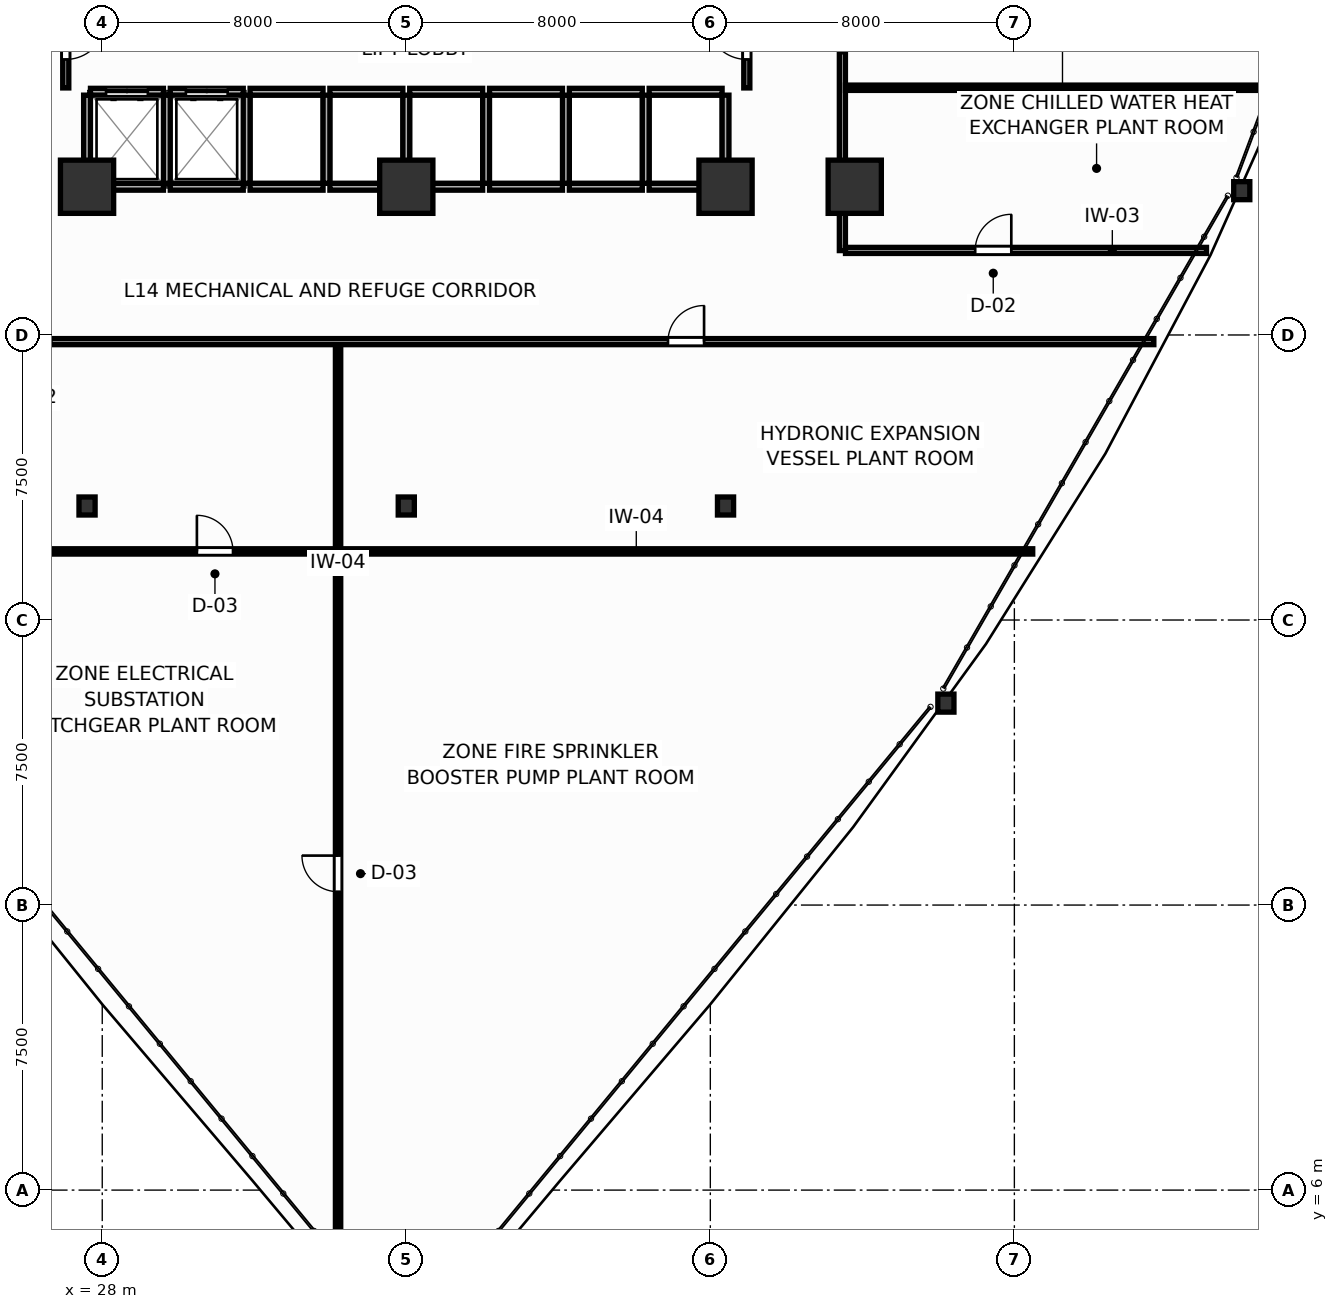
"""IFC4 building model, lengths in metres.
Left out: names, types, materials, properties, quantities, classifications, styles, units other than length and angle.
Written with IfcOpenShell. Run it as: python <this file> out.ifc"""

import sys

from ifc_helpers import new_model, si_unit, direction, frame, frame_2d, origin, origin_2d, place, context, subcontext, project, spatial, rectangle, i_section, extrude, source, transform, mapped, element, fill, save


model = new_model("IFC4")
c1 = context("Model", 3, precision=1e-05, world=origin(), true_north=direction((0.0, 1.0)))
c2 = subcontext(c1, "Body", "Model", "MODEL_VIEW")
j1 = project(units=[si_unit("LENGTHUNIT", "METRE"), si_unit("PLANEANGLEUNIT", "RADIAN")], contexts=[c1])
p1 = place(None, origin())
s1 = spatial("IfcSite", under=j1, at=p1, CompositionType="ELEMENT")
p2 = place(p1, origin())
s2 = spatial("IfcBuilding", under=s1, at=p2, CompositionType="ELEMENT")
p3 = place(p2, frame((0.0, 0.0, 59.1)))
s3 = spatial("IfcBuildingStorey", under=s2, at=p3, CompositionType="ELEMENT", Elevation=59.1)
m1 = source(origin(), c2, "Body", "SweptSolid", [
    extrude(rectangle(XDim=1.4, YDim=1.4, at=origin_2d()), origin(), (0.0, 0.0, 1.0), 4.8),
])
for number, where, z_axis, x_axis in (
    (1, (27.6, 32.4, 0.0), (0.0, 0.0, 1.0), (1.0, 0.0, 0.0)),
    (2, (44.4, 32.4, 0.0), (0.0, 0.0, 1.0), (1.0, 0.0, 0.0)),
    (3, (36.0, 32.4, 0.0), (0.0, 0.0, 1.0), (1.0, 0.0, 0.0)),
    (4, (47.8, 32.4, 0.0), (0.0, 0.0, 1.0), (1.0, 0.0, 0.0)),
):
    element("IfcColumn", number, at=place(p3, frame(where, z_axis=z_axis, x_axis=x_axis)), inside=s3, PredefinedType="COLUMN", context=c2, shape_type="MappedRepresentation", body=[
        mapped(m1, transform((0.0, 0.0, 0.0), scale=1.0)),
    ])
m2 = source(origin(), c2, "Body", "SweptSolid", [
    extrude(i_section(OverallWidth=0.424, OverallDepth=0.474, WebThickness=0.045, FlangeThickness=0.072, FilletRadius=0.015, at=origin_2d()), origin(), (0.0, 0.0, 1.0), 4.8),
])
for number, where, z_axis, x_axis in (
    (5, (27.6, 24.0, 0.0), (0.0, 0.0, 1.0), (1.0, 0.0, 0.0)),
    (6, (44.4, 24.0, 0.0), (0.0, 0.0, 1.0), (1.0, 0.0, 0.0)),
    (7, (36.0, 24.0, 0.0), (0.0, 0.0, 1.0), (1.0, 0.0, 0.0)),
    (8, (50.198, 18.813, 0.0), (0.0, 0.0, 1.0), (1.0, 0.0, 0.0)),
    (9, (57.983, 32.297, 0.0), (0.0, 0.0, 1.0), (1.0, 0.0, 0.0)),
):
    element("IfcColumn", number, at=place(p3, frame(where, z_axis=z_axis, x_axis=x_axis)), inside=s3, PredefinedType="COLUMN", context=c2, shape_type="MappedRepresentation", body=[
        mapped(m2, transform((0.0, 0.0, 0.0), scale=1.0)),
    ])
p4 = place(p3, frame((27.69, 34.9, 0.0), z_axis=(0.0, 0.0, 1.0), x_axis=(1.0, 0.0, 0.0)))
e10 = element("IfcWall", 10, at=p4, inside=s3, PredefinedType="PARTITIONING", context=c2, shape_type="SweptSolid", body=[
    extrude(rectangle(XDim=1.92, YDim=0.18, at=frame_2d((0.96, 0.0))), origin(), (0.0, 0.0, 1.0), 4.58),
])
p5 = place(p4, frame((0.41, 0.0, 0.0)))
e11 = element("IfcOpeningElement", 11, at=p5, cuts=e10, PredefinedType="OPENING", context=c2, shape_type="SweptSolid", body=[
    extrude(rectangle(XDim=1.1, YDim=2.1, at=frame_2d((0.55, 1.05))), frame((0.0, 0.1, 0.0), z_axis=(0.0, -1.0, 0.0), x_axis=(1.0, 0.0, 0.0)), (0.0, 0.0, 1.0), 0.2),
])
p6 = place(p3, frame((27.69, 32.4, 0.0), z_axis=(0.0, 0.0, 1.0), x_axis=(1.0, 0.0, 0.0)))
e12 = element("IfcWall", 12, at=p6, inside=s3, PredefinedType="PARTITIONING", context=c2, shape_type="SweptSolid", body=[
    extrude(rectangle(XDim=1.92, YDim=0.18, at=frame_2d((0.96, 0.0))), origin(), (0.0, 0.0, 1.0), 2.57),
])
p7 = place(p3, frame((27.6, 32.49, 0.0), z_axis=(0.0, 0.0, 1.0), x_axis=(0.0, 1.0, 0.0)))
e13 = element("IfcWall", 13, at=p7, inside=s3, PredefinedType="PARTITIONING", context=c2, shape_type="SweptSolid", body=[
    extrude(rectangle(XDim=2.32, YDim=0.18, at=frame_2d((1.16, 0.0))), origin(), (0.0, 0.0, 1.0), 4.58),
])
p8 = place(p3, frame((29.79, 34.9, 0.0), z_axis=(0.0, 0.0, 1.0), x_axis=(1.0, 0.0, 0.0)))
e14 = element("IfcWall", 14, at=p8, inside=s3, PredefinedType="PARTITIONING", context=c2, shape_type="SweptSolid", body=[
    extrude(rectangle(XDim=1.92, YDim=0.18, at=frame_2d((0.96, 0.0))), origin(), (0.0, 0.0, 1.0), 4.58),
])
p9 = place(p8, frame((0.41, 0.0, 0.0)))
e15 = element("IfcOpeningElement", 15, at=p9, cuts=e14, PredefinedType="OPENING", context=c2, shape_type="SweptSolid", body=[
    extrude(rectangle(XDim=1.1, YDim=2.1, at=frame_2d((0.55, 1.05))), frame((0.0, 0.1, 0.0), z_axis=(0.0, -1.0, 0.0), x_axis=(1.0, 0.0, 0.0)), (0.0, 0.0, 1.0), 0.2),
])
p10 = place(p3, frame((29.79, 32.4, 0.0), z_axis=(0.0, 0.0, 1.0), x_axis=(1.0, 0.0, 0.0)))
e16 = element("IfcWall", 16, at=p10, inside=s3, PredefinedType="PARTITIONING", context=c2, shape_type="SweptSolid", body=[
    extrude(rectangle(XDim=1.92, YDim=0.18, at=frame_2d((0.96, 0.0))), origin(), (0.0, 0.0, 1.0), 2.57),
])
p11 = place(p3, frame((29.7, 32.49, 0.0), z_axis=(0.0, 0.0, 1.0), x_axis=(0.0, 1.0, 0.0)))
e17 = element("IfcWall", 17, at=p11, inside=s3, PredefinedType="PARTITIONING", context=c2, shape_type="SweptSolid", body=[
    extrude(rectangle(XDim=2.32, YDim=0.18, at=frame_2d((1.16, 0.0))), origin(), (0.0, 0.0, 1.0), 4.58),
])
p12 = place(p3, frame((31.89, 34.9, 0.0), z_axis=(0.0, 0.0, 1.0), x_axis=(1.0, 0.0, 0.0)))
e18 = element("IfcWall", 18, at=p12, inside=s3, PredefinedType="PARTITIONING", context=c2, shape_type="SweptSolid", body=[
    extrude(rectangle(XDim=1.92, YDim=0.18, at=frame_2d((0.96, 0.0))), origin(), (0.0, 0.0, 1.0), 4.58),
])
p13 = place(p3, frame((31.89, 32.4, 0.0), z_axis=(0.0, 0.0, 1.0), x_axis=(1.0, 0.0, 0.0)))
e19 = element("IfcWall", 19, at=p13, inside=s3, PredefinedType="PARTITIONING", context=c2, shape_type="SweptSolid", body=[
    extrude(rectangle(XDim=1.92, YDim=0.18, at=frame_2d((0.96, 0.0))), origin(), (0.0, 0.0, 1.0), 2.57),
])
p14 = place(p3, frame((31.8, 32.49, 0.0), z_axis=(0.0, 0.0, 1.0), x_axis=(0.0, 1.0, 0.0)))
e20 = element("IfcWall", 20, at=p14, inside=s3, PredefinedType="PARTITIONING", context=c2, shape_type="SweptSolid", body=[
    extrude(rectangle(XDim=2.32, YDim=0.18, at=frame_2d((1.16, 0.0))), origin(), (0.0, 0.0, 1.0), 4.58),
])
p15 = place(p3, frame((33.99, 34.9, 0.0), z_axis=(0.0, 0.0, 1.0), x_axis=(1.0, 0.0, 0.0)))
e21 = element("IfcWall", 21, at=p15, inside=s3, PredefinedType="PARTITIONING", context=c2, shape_type="SweptSolid", body=[
    extrude(rectangle(XDim=1.92, YDim=0.18, at=frame_2d((0.96, 0.0))), origin(), (0.0, 0.0, 1.0), 4.58),
])
p16 = place(p3, frame((33.99, 32.4, 0.0), z_axis=(0.0, 0.0, 1.0), x_axis=(1.0, 0.0, 0.0)))
e22 = element("IfcWall", 22, at=p16, inside=s3, PredefinedType="PARTITIONING", context=c2, shape_type="SweptSolid", body=[
    extrude(rectangle(XDim=1.92, YDim=0.18, at=frame_2d((0.96, 0.0))), origin(), (0.0, 0.0, 1.0), 2.57),
])
p17 = place(p3, frame((33.9, 32.49, 0.0), z_axis=(0.0, 0.0, 1.0), x_axis=(0.0, 1.0, 0.0)))
e23 = element("IfcWall", 23, at=p17, inside=s3, PredefinedType="PARTITIONING", context=c2, shape_type="SweptSolid", body=[
    extrude(rectangle(XDim=2.32, YDim=0.18, at=frame_2d((1.16, 0.0))), origin(), (0.0, 0.0, 1.0), 4.58),
])
p18 = place(p3, frame((36.09, 34.9, 0.0), z_axis=(0.0, 0.0, 1.0), x_axis=(1.0, 0.0, 0.0)))
e24 = element("IfcWall", 24, at=p18, inside=s3, PredefinedType="PARTITIONING", context=c2, shape_type="SweptSolid", body=[
    extrude(rectangle(XDim=1.92, YDim=0.18, at=frame_2d((0.96, 0.0))), origin(), (0.0, 0.0, 1.0), 4.58),
])
p19 = place(p3, frame((36.09, 32.4, 0.0), z_axis=(0.0, 0.0, 1.0), x_axis=(1.0, 0.0, 0.0)))
e25 = element("IfcWall", 25, at=p19, inside=s3, PredefinedType="PARTITIONING", context=c2, shape_type="SweptSolid", body=[
    extrude(rectangle(XDim=1.92, YDim=0.18, at=frame_2d((0.96, 0.0))), origin(), (0.0, 0.0, 1.0), 2.57),
])
p20 = place(p3, frame((36.0, 32.49, 0.0), z_axis=(0.0, 0.0, 1.0), x_axis=(0.0, 1.0, 0.0)))
e26 = element("IfcWall", 26, at=p20, inside=s3, PredefinedType="PARTITIONING", context=c2, shape_type="SweptSolid", body=[
    extrude(rectangle(XDim=2.32, YDim=0.18, at=frame_2d((1.16, 0.0))), origin(), (0.0, 0.0, 1.0), 4.58),
])
p21 = place(p3, frame((38.19, 34.9, 0.0), z_axis=(0.0, 0.0, 1.0), x_axis=(1.0, 0.0, 0.0)))
e27 = element("IfcWall", 27, at=p21, inside=s3, PredefinedType="PARTITIONING", context=c2, shape_type="SweptSolid", body=[
    extrude(rectangle(XDim=1.92, YDim=0.18, at=frame_2d((0.96, 0.0))), origin(), (0.0, 0.0, 1.0), 4.58),
])
p22 = place(p3, frame((38.19, 32.4, 0.0), z_axis=(0.0, 0.0, 1.0), x_axis=(1.0, 0.0, 0.0)))
e28 = element("IfcWall", 28, at=p22, inside=s3, PredefinedType="PARTITIONING", context=c2, shape_type="SweptSolid", body=[
    extrude(rectangle(XDim=1.92, YDim=0.18, at=frame_2d((0.96, 0.0))), origin(), (0.0, 0.0, 1.0), 2.57),
])
p23 = place(p3, frame((38.1, 32.49, 0.0), z_axis=(0.0, 0.0, 1.0), x_axis=(0.0, 1.0, 0.0)))
e29 = element("IfcWall", 29, at=p23, inside=s3, PredefinedType="PARTITIONING", context=c2, shape_type="SweptSolid", body=[
    extrude(rectangle(XDim=2.32, YDim=0.18, at=frame_2d((1.16, 0.0))), origin(), (0.0, 0.0, 1.0), 4.58),
])
p24 = place(p3, frame((40.29, 34.9, 0.0), z_axis=(0.0, 0.0, 1.0), x_axis=(1.0, 0.0, 0.0)))
e30 = element("IfcWall", 30, at=p24, inside=s3, PredefinedType="PARTITIONING", context=c2, shape_type="SweptSolid", body=[
    extrude(rectangle(XDim=1.92, YDim=0.18, at=frame_2d((0.96, 0.0))), origin(), (0.0, 0.0, 1.0), 4.58),
])
p25 = place(p3, frame((40.29, 32.4, 0.0), z_axis=(0.0, 0.0, 1.0), x_axis=(1.0, 0.0, 0.0)))
e31 = element("IfcWall", 31, at=p25, inside=s3, PredefinedType="PARTITIONING", context=c2, shape_type="SweptSolid", body=[
    extrude(rectangle(XDim=1.92, YDim=0.18, at=frame_2d((0.96, 0.0))), origin(), (0.0, 0.0, 1.0), 2.57),
])
p26 = place(p3, frame((40.2, 32.49, 0.0), z_axis=(0.0, 0.0, 1.0), x_axis=(0.0, 1.0, 0.0)))
e32 = element("IfcWall", 32, at=p26, inside=s3, PredefinedType="PARTITIONING", context=c2, shape_type="SweptSolid", body=[
    extrude(rectangle(XDim=2.32, YDim=0.18, at=frame_2d((1.16, 0.0))), origin(), (0.0, 0.0, 1.0), 4.58),
])
p27 = place(p3, frame((42.39, 34.9, 0.0), z_axis=(0.0, 0.0, 1.0), x_axis=(1.0, 0.0, 0.0)))
e33 = element("IfcWall", 33, at=p27, inside=s3, PredefinedType="PARTITIONING", context=c2, shape_type="SweptSolid", body=[
    extrude(rectangle(XDim=1.92, YDim=0.18, at=frame_2d((0.96, 0.0))), origin(), (0.0, 0.0, 1.0), 4.58),
])
p28 = place(p3, frame((42.39, 32.4, 0.0), z_axis=(0.0, 0.0, 1.0), x_axis=(1.0, 0.0, 0.0)))
e34 = element("IfcWall", 34, at=p28, inside=s3, PredefinedType="PARTITIONING", context=c2, shape_type="SweptSolid", body=[
    extrude(rectangle(XDim=1.92, YDim=0.18, at=frame_2d((0.96, 0.0))), origin(), (0.0, 0.0, 1.0), 2.57),
])
for number, where, z_axis, x_axis in (
    (35, (42.3, 32.49, 0.0), (0.0, 0.0, 1.0), (0.0, 1.0, 0.0)),
    (36, (44.4, 32.49, 0.0), (0.0, 0.0, 1.0), (0.0, 1.0, 0.0)),
):
    element("IfcWall", number, at=place(p3, frame(where, z_axis=z_axis, x_axis=x_axis)), inside=s3, PredefinedType="PARTITIONING", context=c2, shape_type="SweptSolid", body=[
        extrude(rectangle(XDim=2.32, YDim=0.18, at=frame_2d((1.16, 0.0))), origin(), (0.0, 0.0, 1.0), 4.58),
    ])
p29 = place(p3, frame((27.04, 35.0, 0.0), z_axis=(0.0, 0.0, 1.0), x_axis=(0.0, 1.0, 0.0)))
e37 = element("IfcWall", 37, at=p29, inside=s3, PredefinedType="PARTITIONING", context=c2, shape_type="SweptSolid", body=[
    extrude(rectangle(XDim=2.65, YDim=0.16, at=frame_2d((1.325, 0.0))), origin(), (0.0, 0.0, 1.0), 4.58),
])
p30 = place(p29, frame((0.75, 0.0, 0.0)))
e38 = element("IfcOpeningElement", 38, at=p30, cuts=e37, PredefinedType="OPENING", context=c2, shape_type="SweptSolid", body=[
    extrude(rectangle(XDim=1.05, YDim=2.1, at=frame_2d((0.525, 1.05))), frame((0.0, 0.09, 0.0), z_axis=(0.0, -1.0, 0.0), x_axis=(1.0, 0.0, 0.0)), (0.0, 0.0, 1.0), 0.18),
])
p31 = place(p3, frame((44.96, 35.0, 0.0), z_axis=(0.0, 0.0, 1.0), x_axis=(0.0, 1.0, 0.0)))
e39 = element("IfcWall", 39, at=p31, inside=s3, PredefinedType="PARTITIONING", context=c2, shape_type="SweptSolid", body=[
    extrude(rectangle(XDim=2.65, YDim=0.16, at=frame_2d((1.325, 0.0))), origin(), (0.0, 0.0, 1.0), 4.58),
])
p32 = place(p31, frame((0.75, 0.0, 0.0)))
e40 = element("IfcOpeningElement", 40, at=p32, cuts=e39, PredefinedType="OPENING", context=c2, shape_type="SweptSolid", body=[
    extrude(rectangle(XDim=1.05, YDim=2.1, at=frame_2d((0.525, 1.05))), frame((0.0, 0.09, 0.0), z_axis=(0.0, -1.0, 0.0), x_axis=(1.0, 0.0, 0.0)), (0.0, 0.0, 1.0), 0.18),
])
p33 = place(p3, frame((16.33, 28.325, 0.0), z_axis=(0.0, 0.0, 1.0), x_axis=(1.0, 0.0, 0.0)))
e41 = element("IfcWall", 41, at=p33, inside=s3, PredefinedType="PARTITIONING", context=c2, shape_type="SweptSolid", body=[
    extrude(rectangle(XDim=39.34, YDim=0.16, at=frame_2d((19.67, 0.0))), origin(), (0.0, 0.0, 1.0), 4.58),
])
p34 = place(p33, frame((9.382, 0.0, 0.0)))
e42 = element("IfcOpeningElement", 42, at=p34, cuts=e41, PredefinedType="OPENING", context=c2, shape_type="SweptSolid", body=[
    extrude(rectangle(XDim=0.95, YDim=2.05, at=frame_2d((0.475, 1.025))), frame((0.0, 0.09, 0.0), z_axis=(0.0, -1.0, 0.0), x_axis=(1.0, 0.0, 0.0)), (0.0, 0.0, 1.0), 0.18),
])
p35 = place(p33, frame((26.555, 0.0, 0.0)))
e43 = element("IfcOpeningElement", 43, at=p35, cuts=e41, PredefinedType="OPENING", context=c2, shape_type="SweptSolid", body=[
    extrude(rectangle(XDim=0.95, YDim=2.05, at=frame_2d((0.475, 1.025))), frame((0.0, 0.09, 0.0), z_axis=(0.0, -1.0, 0.0), x_axis=(1.0, 0.0, 0.0)), (0.0, 0.0, 1.0), 0.18),
])
p36 = place(p3, frame((47.475, 30.72, 0.0), z_axis=(0.0, 0.0, 1.0), x_axis=(0.0, 1.0, 0.0)))
e44 = element("IfcWall", 44, at=p36, inside=s3, PredefinedType="PARTITIONING", context=c2, shape_type="SweptSolid", body=[
    extrude(rectangle(XDim=18.463, YDim=0.16, at=frame_2d((9.231, 0.0))), origin(), (0.0, 0.0, 1.0), 4.58),
])
p37 = place(p36, frame((10.734, 0.0, 0.0)))
e45 = element("IfcOpeningElement", 45, at=p37, cuts=e44, PredefinedType="OPENING", context=c2, shape_type="SweptSolid", body=[
    extrude(rectangle(XDim=0.95, YDim=2.05, at=frame_2d((0.475, 1.025))), frame((0.0, 0.09, 0.0), z_axis=(0.0, -1.0, 0.0), x_axis=(1.0, 0.0, 0.0)), (0.0, 0.0, 1.0), 0.18),
])
p38 = place(p3, frame((47.557, 30.725, 0.0), z_axis=(0.0, 0.0, 1.0), x_axis=(1.0, 0.0, 0.0)))
e46 = element("IfcWall", 46, at=p38, inside=s3, PredefinedType="PARTITIONING", context=c2, shape_type="SweptSolid", body=[
    extrude(rectangle(XDim=9.499, YDim=0.16, at=frame_2d((4.75, 0.0))), origin(), (0.0, 0.0, 1.0), 4.58),
])
p39 = place(p38, frame((3.412, 0.0, 0.0)))
e47 = element("IfcOpeningElement", 47, at=p39, cuts=e46, PredefinedType="OPENING", context=c2, shape_type="SweptSolid", body=[
    extrude(rectangle(XDim=0.95, YDim=2.05, at=frame_2d((0.475, 1.025))), frame((0.0, 0.09, 0.0), z_axis=(0.0, -1.0, 0.0), x_axis=(1.0, 0.0, 0.0)), (0.0, 0.0, 1.0), 0.18),
])
p40 = place(p3, frame((19.517, 22.805, 0.0), z_axis=(0.0, 0.0, 1.0), x_axis=(1.0, 0.0, 0.0)))
e48 = element("IfcWall", 48, at=p40, inside=s3, PredefinedType="PARTITIONING", context=c2, shape_type="SweptSolid", body=[
    extrude(rectangle(XDim=32.966, YDim=0.14, at=frame_2d((16.483, 0.0))), origin(), (0.0, 0.0, 1.0), 4.58),
])
p41 = place(p40, frame((10.973, 0.0, 0.0)))
e49 = element("IfcOpeningElement", 49, at=p41, cuts=e48, PredefinedType="OPENING", context=c2, shape_type="SweptSolid", body=[
    extrude(rectangle(XDim=0.95, YDim=2.05, at=frame_2d((0.475, 1.025))), frame((0.0, 0.08, 0.0), z_axis=(0.0, -1.0, 0.0), x_axis=(1.0, 0.0, 0.0)), (0.0, 0.0, 1.0), 0.16),
])
p42 = place(p3, frame((34.205, 4.529, 0.0), z_axis=(0.0, 0.0, 1.0), x_axis=(0.0, 1.0, 0.0)))
e50 = element("IfcWall", 50, at=p42, inside=s3, PredefinedType="PARTITIONING", context=c2, shape_type="SweptSolid", body=[
    extrude(rectangle(XDim=23.714, YDim=0.14, at=frame_2d((11.857, 0.0))), origin(), (0.0, 0.0, 1.0), 2.57),
])
p43 = place(p42, frame((9.322, 0.0, 0.0)))
e51 = element("IfcOpeningElement", 51, at=p43, cuts=e50, PredefinedType="OPENING", context=c2, shape_type="SweptSolid", body=[
    extrude(rectangle(XDim=0.95, YDim=2.05, at=frame_2d((0.475, 1.025))), frame((0.0, 0.08, 0.0), z_axis=(0.0, -1.0, 0.0), x_axis=(1.0, 0.0, 0.0)), (0.0, 0.0, 1.0), 0.16),
])
p44 = place(p3, frame((47.557, 35.005, 0.0), z_axis=(0.0, 0.0, 1.0), x_axis=(1.0, 0.0, 0.0)))
e52 = element("IfcWall", 52, at=p44, inside=s3, PredefinedType="PARTITIONING", context=c2, shape_type="SweptSolid", body=[
    extrude(rectangle(XDim=11.419, YDim=0.14, at=frame_2d((5.709, 0.0))), origin(), (0.0, 0.0, 1.0), 4.58),
])
p45 = place(p5, origin())
e53 = element("IfcDoor", 53, at=p45, inside=s3, OperationType="DOUBLE_DOOR_SLIDING", PredefinedType="DOOR", context=c2, shape_type="SweptSolid", body=[
    extrude(rectangle(XDim=1.1, YDim=2.1, at=frame_2d((0.55, 1.05))), frame((0.0, 0.025, 0.0), z_axis=(0.0, -1.0, 0.0), x_axis=(1.0, 0.0, 0.0)), (0.0, 0.0, 1.0), 0.05),
])
fill(e11, e53)
p46 = place(p9, origin())
e54 = element("IfcDoor", 54, at=p46, inside=s3, OperationType="DOUBLE_DOOR_SLIDING", PredefinedType="DOOR", context=c2, shape_type="SweptSolid", body=[
    extrude(rectangle(XDim=1.1, YDim=2.1, at=frame_2d((0.55, 1.05))), frame((0.0, 0.025, 0.0), z_axis=(0.0, -1.0, 0.0), x_axis=(1.0, 0.0, 0.0)), (0.0, 0.0, 1.0), 0.05),
])
fill(e15, e54)
p47 = place(p30, frame((1.05, 0.0, 0.0), z_axis=(0.0, 0.0, 1.0), x_axis=(-1.0, 0.0, 0.0)))
e55 = element("IfcDoor", 55, at=p47, inside=s3, OperationType="SINGLE_SWING_LEFT", PredefinedType="DOOR", context=c2, shape_type="SweptSolid", body=[
    extrude(rectangle(XDim=1.05, YDim=2.1, at=frame_2d((0.525, 1.05))), frame((0.0, 0.025, 0.0), z_axis=(0.0, -1.0, 0.0), x_axis=(1.0, 0.0, 0.0)), (0.0, 0.0, 1.0), 0.05),
])
fill(e38, e55)
p48 = place(p32, origin())
e56 = element("IfcDoor", 56, at=p48, inside=s3, OperationType="SINGLE_SWING_RIGHT", PredefinedType="DOOR", context=c2, shape_type="SweptSolid", body=[
    extrude(rectangle(XDim=1.05, YDim=2.1, at=frame_2d((0.525, 1.05))), frame((0.0, 0.025, 0.0), z_axis=(0.0, -1.0, 0.0), x_axis=(1.0, 0.0, 0.0)), (0.0, 0.0, 1.0), 0.05),
])
fill(e40, e56)
p49 = place(p35, origin())
e57 = element("IfcDoor", 57, at=p49, inside=s3, OperationType="SINGLE_SWING_RIGHT", PredefinedType="DOOR", context=c2, shape_type="SweptSolid", body=[
    extrude(rectangle(XDim=0.95, YDim=2.05, at=frame_2d((0.475, 1.025))), frame((0.0, 0.025, 0.0), z_axis=(0.0, -1.0, 0.0), x_axis=(1.0, 0.0, 0.0)), (0.0, 0.0, 1.0), 0.05),
])
fill(e43, e57)
p50 = place(p39, origin())
e58 = element("IfcDoor", 58, at=p50, inside=s3, OperationType="SINGLE_SWING_RIGHT", PredefinedType="DOOR", context=c2, shape_type="SweptSolid", body=[
    extrude(rectangle(XDim=0.95, YDim=2.05, at=frame_2d((0.475, 1.025))), frame((0.0, 0.025, 0.0), z_axis=(0.0, -1.0, 0.0), x_axis=(1.0, 0.0, 0.0)), (0.0, 0.0, 1.0), 0.05),
])
fill(e47, e58)
p51 = place(p41, origin())
e59 = element("IfcDoor", 59, at=p51, inside=s3, OperationType="SINGLE_SWING_LEFT", PredefinedType="DOOR", context=c2, shape_type="SweptSolid", body=[
    extrude(rectangle(XDim=0.95, YDim=2.05, at=frame_2d((0.475, 1.025))), frame((0.0, 0.025, 0.0), z_axis=(0.0, -1.0, 0.0), x_axis=(1.0, 0.0, 0.0)), (0.0, 0.0, 1.0), 0.05),
])
fill(e49, e59)
p52 = place(p43, origin())
e60 = element("IfcDoor", 60, at=p52, inside=s3, OperationType="SINGLE_SWING_RIGHT", PredefinedType="DOOR", context=c2, shape_type="SweptSolid", body=[
    extrude(rectangle(XDim=0.95, YDim=2.05, at=frame_2d((0.475, 1.025))), frame((0.0, 0.025, 0.0), z_axis=(0.0, -1.0, 0.0), x_axis=(1.0, 0.0, 0.0)), (0.0, 0.0, 1.0), 0.05),
])
fill(e51, e60)
save(model, sys.argv[1])
